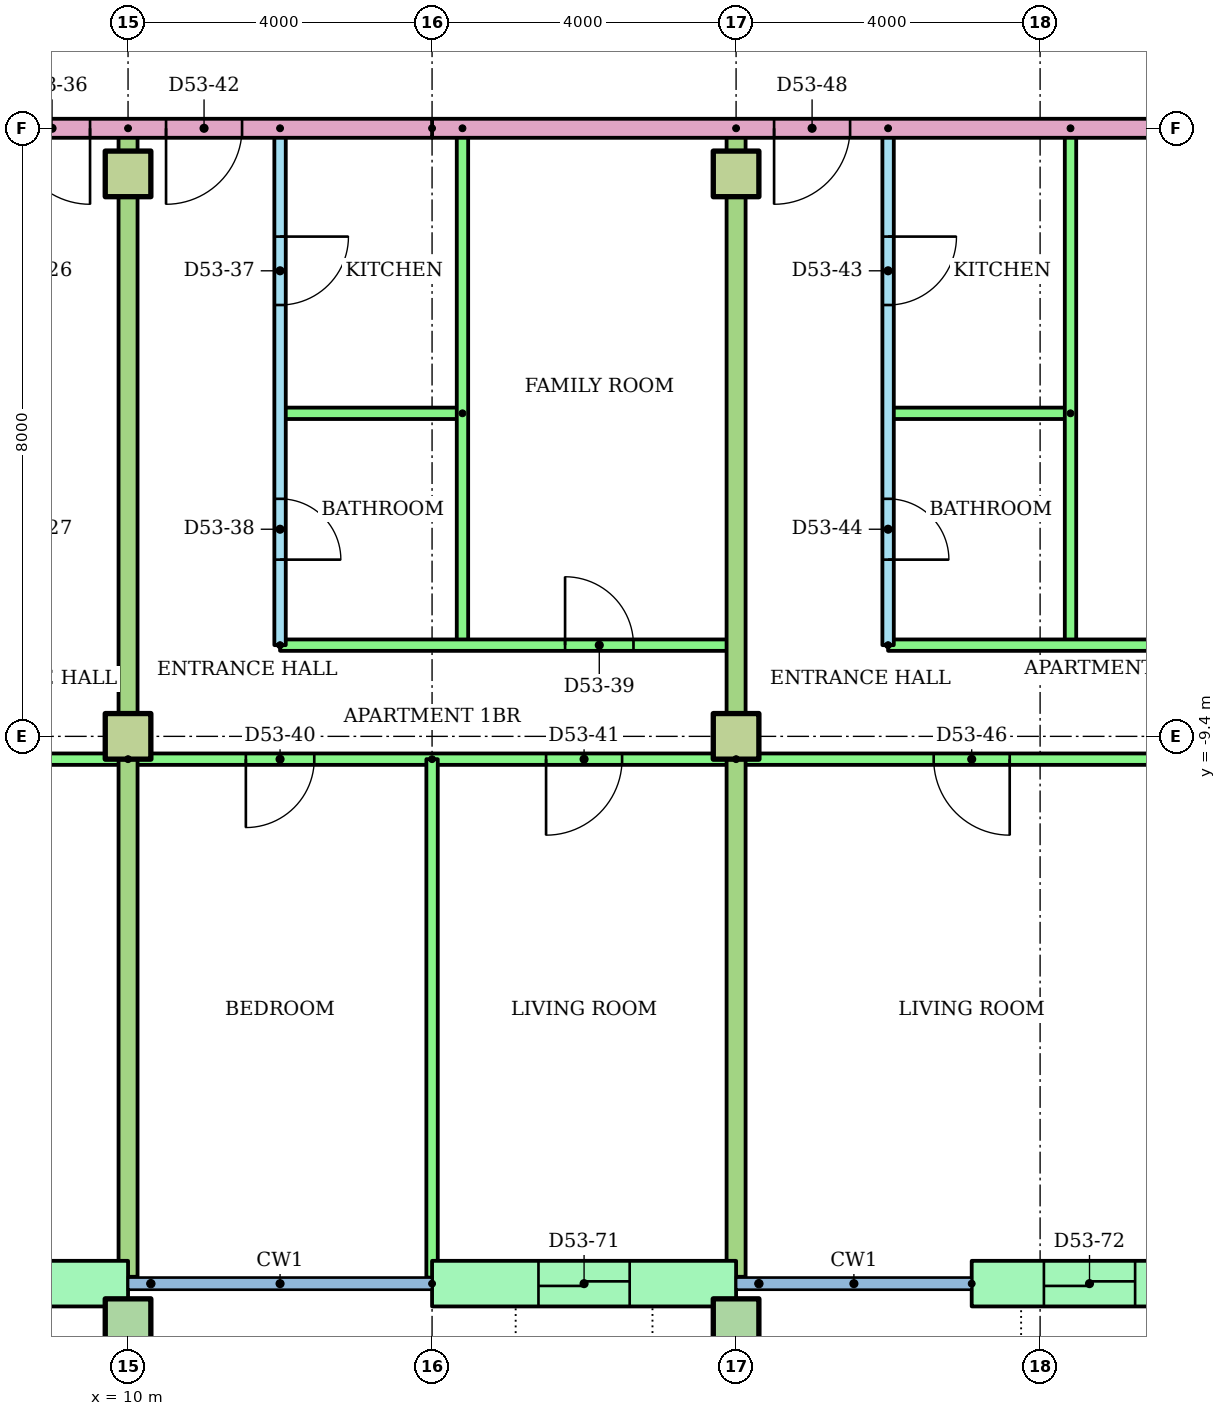
"""IFC4 building model, lengths in metres.
Left out: names, types, materials, properties, quantities, classifications, styles, units other than length and angle.
Written with IfcOpenShell. Run it as: python <this file> out.ifc"""

import sys

from ifc_helpers import new_model, si_unit, direction, frame, frame_2d, origin, origin_2d, place, context, subcontext, project, spatial, rectangle, hollow_rectangle, extrude, element, fill, save


model = new_model("IFC4")
c1 = context("Model", 3, precision=1e-05, world=origin(), true_north=direction((0.0, 1.0)))
c2 = subcontext(c1, "Body", "Model", "MODEL_VIEW")
j1 = project(units=[si_unit("LENGTHUNIT", "METRE"), si_unit("PLANEANGLEUNIT", "RADIAN")], contexts=[c1])
p1 = place(None, origin())
s1 = spatial("IfcSite", under=j1, at=p1, CompositionType="ELEMENT")
p2 = place(p1, origin())
s2 = spatial("IfcBuilding", under=s1, at=p2, CompositionType="ELEMENT")
p3 = place(p2, frame((0.0, 0.0, 207.6)))
s3 = spatial("IfcBuildingStorey", under=s2, at=p3, CompositionType="ELEMENT", Elevation=207.6)
for number, where in (
    (1, (10.0, -17.1, 0.0)),
    (2, (18.0, -17.1, 0.0)),
):
    element("IfcColumn", number, at=place(p3, frame(where)), inside=s3, PredefinedType="COLUMN", context=c2, shape_type="SweptSolid", body=[
        extrude(hollow_rectangle(XDim=0.6, YDim=0.6, WallThickness=0.03, at=origin_2d()), origin(), (0.0, 0.0, 1.0), 3.2),
    ])
for number, where in (
    (3, (10.0, -9.4, 0.0)),
    (4, (18.0, -9.4, 0.0)),
    (5, (10.0, -2.0, 0.0)),
    (6, (18.0, -2.0, 0.0)),
):
    element("IfcColumn", number, at=place(p3, frame(where)), inside=s3, PredefinedType="COLUMN", context=c2, shape_type="SweptSolid", body=[
        extrude(rectangle(XDim=0.6, YDim=0.6, at=origin_2d()), origin(), (0.0, 0.0, 1.0), 3.2),
    ])
p4 = place(p3, frame((6.0, -16.6, 0.0)))
e7 = element("IfcWall", 7, at=p4, inside=s3, PredefinedType="STANDARD", context=c2, shape_type="SweptSolid", body=[
    extrude(rectangle(XDim=4.0, YDim=0.6, at=frame_2d((2.0, 0.0))), origin(), (0.0, 0.0, 1.0), 2.92),
])
p5 = place(p4, frame((1.4, 0.0, 0.0)))
e8 = element("IfcOpeningElement", 8, at=p5, cuts=e7, PredefinedType="OPENING", context=c2, shape_type="SweptSolid", body=[
    extrude(rectangle(XDim=1.2, YDim=2.1, at=frame_2d((0.6, 1.05))), frame((0.0, 0.31, 0.0), z_axis=(0.0, -1.0, 0.0), x_axis=(1.0, 0.0, 0.0)), (0.0, 0.0, 1.0), 0.62),
])
p6 = place(p3, frame((14.0, -16.6, 0.0)))
e9 = element("IfcWall", 9, at=p6, inside=s3, PredefinedType="STANDARD", context=c2, shape_type="SweptSolid", body=[
    extrude(rectangle(XDim=4.0, YDim=0.6, at=frame_2d((2.0, 0.0))), origin(), (0.0, 0.0, 1.0), 2.92),
])
p7 = place(p6, frame((1.4, 0.0, 0.0)))
e10 = element("IfcOpeningElement", 10, at=p7, cuts=e9, PredefinedType="OPENING", context=c2, shape_type="SweptSolid", body=[
    extrude(rectangle(XDim=1.2, YDim=2.1, at=frame_2d((0.6, 1.05))), frame((0.0, 0.31, 0.0), z_axis=(0.0, -1.0, 0.0), x_axis=(1.0, 0.0, 0.0)), (0.0, 0.0, 1.0), 0.62),
])
p8 = place(p3, frame((21.1, -16.6, 0.0)))
e11 = element("IfcWall", 11, at=p8, inside=s3, PredefinedType="STANDARD", context=c2, shape_type="SweptSolid", body=[
    extrude(rectangle(XDim=3.1, YDim=0.6, at=frame_2d((1.55, 0.0))), origin(), (0.0, 0.0, 1.0), 2.92),
])
p9 = place(p8, frame((0.95, 0.0, 0.0)))
e12 = element("IfcOpeningElement", 12, at=p9, cuts=e11, PredefinedType="OPENING", context=c2, shape_type="SweptSolid", body=[
    extrude(rectangle(XDim=1.2, YDim=2.1, at=frame_2d((0.6, 1.05))), frame((0.0, 0.31, 0.0), z_axis=(0.0, -1.0, 0.0), x_axis=(1.0, 0.0, 0.0)), (0.0, 0.0, 1.0), 0.62),
])
p10 = place(p3, frame((10.0, -9.7, 0.0), z_axis=(0.0, 0.0, 1.0), x_axis=(-1.0, 0.0, 0.0)))
e13 = element("IfcWall", 13, at=p10, inside=s3, PredefinedType="PARTITIONING", context=c2, shape_type="SweptSolid", body=[
    extrude(rectangle(XDim=24.0, YDim=0.15, at=frame_2d((12.0, 0.0))), origin(), (0.0, 0.0, 1.0), 2.4),
])
p11 = place(p10, frame((21.55, 0.0, 0.0)))
e14 = element("IfcOpeningElement", 14, at=p11, cuts=e13, PredefinedType="OPENING", context=c2, shape_type="SweptSolid", body=[
    extrude(rectangle(XDim=0.9, YDim=2.1, at=frame_2d((0.45, 1.05))), frame((0.0, 0.085, 0.0), z_axis=(0.0, -1.0, 0.0), x_axis=(1.0, 0.0, 0.0)), (0.0, 0.0, 1.0), 0.17),
])
p12 = place(p10, frame((17.55, 0.0, 0.0)))
e15 = element("IfcOpeningElement", 15, at=p12, cuts=e13, PredefinedType="OPENING", context=c2, shape_type="SweptSolid", body=[
    extrude(rectangle(XDim=0.9, YDim=2.1, at=frame_2d((0.45, 1.05))), frame((0.0, 0.085, 0.0), z_axis=(0.0, -1.0, 0.0), x_axis=(1.0, 0.0, 0.0)), (0.0, 0.0, 1.0), 0.17),
])
p13 = place(p10, frame((11.5, 0.0, 0.0)))
e16 = element("IfcOpeningElement", 16, at=p13, cuts=e13, PredefinedType="OPENING", context=c2, shape_type="SweptSolid", body=[
    extrude(rectangle(XDim=1.0, YDim=2.1, at=frame_2d((0.5, 1.05))), frame((0.0, 0.085, 0.0), z_axis=(0.0, -1.0, 0.0), x_axis=(1.0, 0.0, 0.0)), (0.0, 0.0, 1.0), 0.17),
])
p14 = place(p10, frame((5.55, 0.0, 0.0)))
e17 = element("IfcOpeningElement", 17, at=p14, cuts=e13, PredefinedType="OPENING", context=c2, shape_type="SweptSolid", body=[
    extrude(rectangle(XDim=0.9, YDim=2.1, at=frame_2d((0.45, 1.05))), frame((0.0, 0.085, 0.0), z_axis=(0.0, -1.0, 0.0), x_axis=(1.0, 0.0, 0.0)), (0.0, 0.0, 1.0), 0.17),
])
p15 = place(p10, frame((1.55, 0.0, 0.0)))
e18 = element("IfcOpeningElement", 18, at=p15, cuts=e13, PredefinedType="OPENING", context=c2, shape_type="SweptSolid", body=[
    extrude(rectangle(XDim=0.9, YDim=2.1, at=frame_2d((0.45, 1.05))), frame((0.0, 0.085, 0.0), z_axis=(0.0, -1.0, 0.0), x_axis=(1.0, 0.0, 0.0)), (0.0, 0.0, 1.0), 0.17),
])
p16 = place(p3, frame((12.0, -1.4, 0.0), z_axis=(0.0, 0.0, 1.0), x_axis=(0.0, -1.0, 0.0)))
e19 = element("IfcWall", 19, at=p16, inside=s3, PredefinedType="PARTITIONING", context=c2, shape_type="SweptSolid", body=[
    extrude(rectangle(XDim=6.8, YDim=0.15, at=frame_2d((3.4, 0.0))), origin(), (0.0, 0.0, 1.0), 2.4),
])
p17 = place(p16, frame((1.425, 0.0, 0.0)))
e20 = element("IfcOpeningElement", 20, at=p17, cuts=e19, PredefinedType="OPENING", context=c2, shape_type="SweptSolid", body=[
    extrude(rectangle(XDim=0.9, YDim=2.1, at=frame_2d((0.45, 1.05))), frame((0.0, 0.085, 0.0), z_axis=(0.0, -1.0, 0.0), x_axis=(1.0, 0.0, 0.0)), (0.0, 0.0, 1.0), 0.17),
])
p18 = place(p16, frame((4.875, 0.0, 0.0)))
e21 = element("IfcOpeningElement", 21, at=p18, cuts=e19, PredefinedType="OPENING", context=c2, shape_type="SweptSolid", body=[
    extrude(rectangle(XDim=0.8, YDim=2.1, at=frame_2d((0.4, 1.05))), frame((0.0, 0.085, 0.0), z_axis=(0.0, -1.0, 0.0), x_axis=(1.0, 0.0, 0.0)), (0.0, 0.0, 1.0), 0.17),
])
p19 = place(p3, frame((14.4, -5.15, 0.0), z_axis=(0.0, 0.0, 1.0), x_axis=(-1.0, 0.0, 0.0)))
e22 = element("IfcWall", 22, at=p19, inside=s3, PredefinedType="PARTITIONING", context=c2, shape_type="SweptSolid", body=[
    extrude(rectangle(XDim=2.4, YDim=0.15, at=frame_2d((1.2, 0.0))), origin(), (0.0, 0.0, 1.0), 2.4),
])
p20 = place(p3, frame((14.4, -1.4, 0.0), z_axis=(0.0, 0.0, 1.0), x_axis=(0.0, -1.0, 0.0)))
e23 = element("IfcWall", 23, at=p20, inside=s3, PredefinedType="PARTITIONING", context=c2, shape_type="SweptSolid", body=[
    extrude(rectangle(XDim=6.8, YDim=0.15, at=frame_2d((3.4, 0.0))), origin(), (0.0, 0.0, 1.0), 2.4),
])
p21 = place(p3, frame((12.0, -8.2, 0.0)))
e24 = element("IfcWall", 24, at=p21, inside=s3, PredefinedType="PARTITIONING", context=c2, shape_type="SweptSolid", body=[
    extrude(rectangle(XDim=6.0, YDim=0.15, at=frame_2d((3.0, 0.0))), origin(), (0.0, 0.0, 1.0), 2.4),
])
p22 = place(p21, frame((3.75, 0.0, 0.0)))
e25 = element("IfcOpeningElement", 25, at=p22, cuts=e24, PredefinedType="OPENING", context=c2, shape_type="SweptSolid", body=[
    extrude(rectangle(XDim=0.9, YDim=2.1, at=frame_2d((0.45, 1.05))), frame((0.0, 0.085, 0.0), z_axis=(0.0, -1.0, 0.0), x_axis=(1.0, 0.0, 0.0)), (0.0, 0.0, 1.0), 0.17),
])
p23 = place(p3, frame((18.0, -9.7, 0.0), z_axis=(0.0, 0.0, 1.0), x_axis=(-1.0, 0.0, 0.0)))
e26 = element("IfcWall", 26, at=p23, inside=s3, PredefinedType="PARTITIONING", context=c2, shape_type="SweptSolid", body=[
    extrude(rectangle(XDim=8.0, YDim=0.15, at=frame_2d((4.0, 0.0))), origin(), (0.0, 0.0, 1.0), 2.4),
])
p24 = place(p23, frame((5.55, 0.0, 0.0)))
e27 = element("IfcOpeningElement", 27, at=p24, cuts=e26, PredefinedType="OPENING", context=c2, shape_type="SweptSolid", body=[
    extrude(rectangle(XDim=0.9, YDim=2.1, at=frame_2d((0.45, 1.05))), frame((0.0, 0.085, 0.0), z_axis=(0.0, -1.0, 0.0), x_axis=(1.0, 0.0, 0.0)), (0.0, 0.0, 1.0), 0.17),
])
p25 = place(p23, frame((1.5, 0.0, 0.0)))
e28 = element("IfcOpeningElement", 28, at=p25, cuts=e26, PredefinedType="OPENING", context=c2, shape_type="SweptSolid", body=[
    extrude(rectangle(XDim=1.0, YDim=2.1, at=frame_2d((0.5, 1.05))), frame((0.0, 0.085, 0.0), z_axis=(0.0, -1.0, 0.0), x_axis=(1.0, 0.0, 0.0)), (0.0, 0.0, 1.0), 0.17),
])
p26 = place(p3, frame((14.0, -9.7, 0.0), z_axis=(0.0, 0.0, 1.0), x_axis=(0.0, -1.0, 0.0)))
e29 = element("IfcWall", 29, at=p26, inside=s3, PredefinedType="PARTITIONING", context=c2, shape_type="SweptSolid", body=[
    extrude(rectangle(XDim=6.821, YDim=0.15, at=frame_2d((3.411, 0.0))), origin(), (0.0, 0.0, 1.0), 2.4),
])
p27 = place(p3, frame((10.0, -1.4, 0.0), z_axis=(0.0, 0.0, 1.0), x_axis=(0.0, -1.0, 0.0)))
e30 = element("IfcWall", 30, at=p27, inside=s3, PredefinedType="PARTITIONING", context=c2, shape_type="SweptSolid", body=[
    extrude(rectangle(XDim=15.11, YDim=0.25, at=frame_2d((7.555, 0.0))), origin(), (0.0, 0.0, 1.0), 2.4),
])
p28 = place(p3, frame((20.0, -1.4, 0.0), z_axis=(0.0, 0.0, 1.0), x_axis=(0.0, -1.0, 0.0)))
e31 = element("IfcWall", 31, at=p28, inside=s3, PredefinedType="PARTITIONING", context=c2, shape_type="SweptSolid", body=[
    extrude(rectangle(XDim=6.8, YDim=0.15, at=frame_2d((3.4, 0.0))), origin(), (0.0, 0.0, 1.0), 2.4),
])
p29 = place(p28, frame((1.425, 0.0, 0.0)))
e32 = element("IfcOpeningElement", 32, at=p29, cuts=e31, PredefinedType="OPENING", context=c2, shape_type="SweptSolid", body=[
    extrude(rectangle(XDim=0.9, YDim=2.1, at=frame_2d((0.45, 1.05))), frame((0.0, 0.085, 0.0), z_axis=(0.0, -1.0, 0.0), x_axis=(1.0, 0.0, 0.0)), (0.0, 0.0, 1.0), 0.17),
])
p30 = place(p28, frame((4.875, 0.0, 0.0)))
e33 = element("IfcOpeningElement", 33, at=p30, cuts=e31, PredefinedType="OPENING", context=c2, shape_type="SweptSolid", body=[
    extrude(rectangle(XDim=0.8, YDim=2.1, at=frame_2d((0.4, 1.05))), frame((0.0, 0.085, 0.0), z_axis=(0.0, -1.0, 0.0), x_axis=(1.0, 0.0, 0.0)), (0.0, 0.0, 1.0), 0.17),
])
p31 = place(p3, frame((22.4, -5.15, 0.0), z_axis=(0.0, 0.0, 1.0), x_axis=(-1.0, 0.0, 0.0)))
e34 = element("IfcWall", 34, at=p31, inside=s3, PredefinedType="PARTITIONING", context=c2, shape_type="SweptSolid", body=[
    extrude(rectangle(XDim=2.4, YDim=0.15, at=frame_2d((1.2, 0.0))), origin(), (0.0, 0.0, 1.0), 2.4),
])
p32 = place(p3, frame((22.4, -1.4, 0.0), z_axis=(0.0, 0.0, 1.0), x_axis=(0.0, -1.0, 0.0)))
e35 = element("IfcWall", 35, at=p32, inside=s3, PredefinedType="PARTITIONING", context=c2, shape_type="SweptSolid", body=[
    extrude(rectangle(XDim=6.8, YDim=0.15, at=frame_2d((3.4, 0.0))), origin(), (0.0, 0.0, 1.0), 2.4),
])
p33 = place(p3, frame((20.0, -8.2, 0.0)))
e36 = element("IfcWall", 36, at=p33, inside=s3, PredefinedType="PARTITIONING", context=c2, shape_type="SweptSolid", body=[
    extrude(rectangle(XDim=8.92, YDim=0.15, at=frame_2d((4.46, 0.0))), origin(), (0.0, 0.0, 1.0), 2.4),
])
p34 = place(p33, frame((4.624, 0.0, 0.0)))
e37 = element("IfcOpeningElement", 37, at=p34, cuts=e36, PredefinedType="OPENING", context=c2, shape_type="SweptSolid", body=[
    extrude(rectangle(XDim=0.9, YDim=2.1, at=frame_2d((0.45, 1.05))), frame((0.0, 0.085, 0.0), z_axis=(0.0, -1.0, 0.0), x_axis=(1.0, 0.0, 0.0)), (0.0, 0.0, 1.0), 0.17),
])
p35 = place(p3, frame((28.92, -9.7, 0.0), z_axis=(0.0, 0.0, 1.0), x_axis=(-1.0, 0.0, 0.0)))
e38 = element("IfcWall", 38, at=p35, inside=s3, PredefinedType="PARTITIONING", context=c2, shape_type="SweptSolid", body=[
    extrude(rectangle(XDim=10.92, YDim=0.15, at=frame_2d((5.46, 0.0))), origin(), (0.0, 0.0, 1.0), 2.4),
])
p36 = place(p35, frame((7.32, 0.0, 0.0)))
e39 = element("IfcOpeningElement", 39, at=p36, cuts=e38, PredefinedType="OPENING", context=c2, shape_type="SweptSolid", body=[
    extrude(rectangle(XDim=1.0, YDim=2.1, at=frame_2d((0.5, 1.05))), frame((0.0, 0.085, 0.0), z_axis=(0.0, -1.0, 0.0), x_axis=(1.0, 0.0, 0.0)), (0.0, 0.0, 1.0), 0.17),
])
p37 = place(p35, frame((1.544, 0.0, 0.0)))
e40 = element("IfcOpeningElement", 40, at=p37, cuts=e38, PredefinedType="OPENING", context=c2, shape_type="SweptSolid", body=[
    extrude(rectangle(XDim=0.9, YDim=2.1, at=frame_2d((0.45, 1.05))), frame((0.0, 0.085, 0.0), z_axis=(0.0, -1.0, 0.0), x_axis=(1.0, 0.0, 0.0)), (0.0, 0.0, 1.0), 0.17),
])
p38 = place(p3, frame((18.0, -1.4, 0.0), z_axis=(0.0, 0.0, 1.0), x_axis=(0.0, -1.0, 0.0)))
e41 = element("IfcWall", 41, at=p38, inside=s3, PredefinedType="PARTITIONING", context=c2, shape_type="SweptSolid", body=[
    extrude(rectangle(XDim=15.11, YDim=0.25, at=frame_2d((7.555, 0.0))), origin(), (0.0, 0.0, 1.0), 2.4),
])
p39 = place(p3, frame((28.92, -1.4, 0.0), z_axis=(0.0, 0.0, 1.0), x_axis=(-1.0, 0.0, 0.0)))
e42 = element("IfcWall", 42, at=p39, inside=s3, PredefinedType="PARTITIONING", context=c2, shape_type="SweptSolid", body=[
    extrude(rectangle(XDim=14.92, YDim=0.25, at=frame_2d((7.46, 0.0))), origin(), (0.0, 0.0, 1.0), 2.4),
])
p40 = place(p39, frame((9.42, 0.0, 0.0)))
e43 = element("IfcOpeningElement", 43, at=p40, cuts=e42, PredefinedType="OPENING", context=c2, shape_type="SweptSolid", body=[
    extrude(rectangle(XDim=1.0, YDim=2.1, at=frame_2d((0.5, 1.05))), frame((0.0, 0.135, 0.0), z_axis=(0.0, -1.0, 0.0), x_axis=(1.0, 0.0, 0.0)), (0.0, 0.0, 1.0), 0.27),
])
p41 = place(p3, frame((14.0, -1.4, 0.0), z_axis=(0.0, 0.0, 1.0), x_axis=(-1.0, 0.0, 0.0)))
e44 = element("IfcWall", 44, at=p41, inside=s3, PredefinedType="PARTITIONING", context=c2, shape_type="SweptSolid", body=[
    extrude(rectangle(XDim=28.0, YDim=0.25, at=frame_2d((14.0, 0.0))), origin(), (0.0, 0.0, 1.0), 2.4),
])
p42 = place(p41, frame((4.5, 0.0, 0.0)))
e45 = element("IfcOpeningElement", 45, at=p42, cuts=e44, PredefinedType="OPENING", context=c2, shape_type="SweptSolid", body=[
    extrude(rectangle(XDim=1.0, YDim=2.1, at=frame_2d((0.5, 1.05))), frame((0.0, 0.135, 0.0), z_axis=(0.0, -1.0, 0.0), x_axis=(1.0, 0.0, 0.0)), (0.0, 0.0, 1.0), 0.27),
])
p43 = place(p41, frame((2.5, 0.0, 0.0)))
e46 = element("IfcOpeningElement", 46, at=p43, cuts=e44, PredefinedType="OPENING", context=c2, shape_type="SweptSolid", body=[
    extrude(rectangle(XDim=1.0, YDim=2.1, at=frame_2d((0.5, 1.05))), frame((0.0, 0.135, 0.0), z_axis=(0.0, -1.0, 0.0), x_axis=(1.0, 0.0, 0.0)), (0.0, 0.0, 1.0), 0.27),
])
p44 = place(p42, origin())
e47 = element("IfcDoor", 47, at=p44, inside=s3, OperationType="SINGLE_SWING_LEFT", PredefinedType="DOOR", context=c2, shape_type="SweptSolid", body=[
    extrude(rectangle(XDim=1.0, YDim=2.1, at=frame_2d((0.5, 1.05))), frame((0.0, 0.025, 0.0), z_axis=(0.0, -1.0, 0.0), x_axis=(1.0, 0.0, 0.0)), (0.0, 0.0, 1.0), 0.05),
])
fill(e45, e47)
p45 = place(p17, origin())
e48 = element("IfcDoor", 48, at=p45, inside=s3, OperationType="SINGLE_SWING_LEFT", PredefinedType="DOOR", context=c2, shape_type="SweptSolid", body=[
    extrude(rectangle(XDim=0.9, YDim=2.1, at=frame_2d((0.45, 1.05))), frame((0.0, 0.025, 0.0), z_axis=(0.0, -1.0, 0.0), x_axis=(1.0, 0.0, 0.0)), (0.0, 0.0, 1.0), 0.05),
])
fill(e20, e48)
p46 = place(p18, origin())
e49 = element("IfcDoor", 49, at=p46, inside=s3, OperationType="SINGLE_SWING_RIGHT", PredefinedType="DOOR", context=c2, shape_type="SweptSolid", body=[
    extrude(rectangle(XDim=0.8, YDim=2.1, at=frame_2d((0.4, 1.05))), frame((0.0, 0.025, 0.0), z_axis=(0.0, -1.0, 0.0), x_axis=(1.0, 0.0, 0.0)), (0.0, 0.0, 1.0), 0.05),
])
fill(e21, e49)
p47 = place(p22, origin())
e50 = element("IfcDoor", 50, at=p47, inside=s3, OperationType="SINGLE_SWING_LEFT", PredefinedType="DOOR", context=c2, shape_type="SweptSolid", body=[
    extrude(rectangle(XDim=0.9, YDim=2.1, at=frame_2d((0.45, 1.05))), frame((0.0, 0.025, 0.0), z_axis=(0.0, -1.0, 0.0), x_axis=(1.0, 0.0, 0.0)), (0.0, 0.0, 1.0), 0.05),
])
fill(e25, e50)
p48 = place(p24, origin())
e51 = element("IfcDoor", 51, at=p48, inside=s3, OperationType="SINGLE_SWING_RIGHT", PredefinedType="DOOR", context=c2, shape_type="SweptSolid", body=[
    extrude(rectangle(XDim=0.9, YDim=2.1, at=frame_2d((0.45, 1.05))), frame((0.0, 0.025, 0.0), z_axis=(0.0, -1.0, 0.0), x_axis=(1.0, 0.0, 0.0)), (0.0, 0.0, 1.0), 0.05),
])
fill(e27, e51)
p49 = place(p25, origin())
e52 = element("IfcDoor", 52, at=p49, inside=s3, OperationType="SINGLE_SWING_RIGHT", PredefinedType="DOOR", context=c2, shape_type="SweptSolid", body=[
    extrude(rectangle(XDim=1.0, YDim=2.1, at=frame_2d((0.5, 1.05))), frame((0.0, 0.025, 0.0), z_axis=(0.0, -1.0, 0.0), x_axis=(1.0, 0.0, 0.0)), (0.0, 0.0, 1.0), 0.05),
])
fill(e28, e52)
p50 = place(p43, origin())
e53 = element("IfcDoor", 53, at=p50, inside=s3, OperationType="SINGLE_SWING_RIGHT", PredefinedType="DOOR", context=c2, shape_type="SweptSolid", body=[
    extrude(rectangle(XDim=1.0, YDim=2.1, at=frame_2d((0.5, 1.05))), frame((0.0, 0.025, 0.0), z_axis=(0.0, -1.0, 0.0), x_axis=(1.0, 0.0, 0.0)), (0.0, 0.0, 1.0), 0.05),
])
fill(e46, e53)
p51 = place(p29, origin())
e54 = element("IfcDoor", 54, at=p51, inside=s3, OperationType="SINGLE_SWING_LEFT", PredefinedType="DOOR", context=c2, shape_type="SweptSolid", body=[
    extrude(rectangle(XDim=0.9, YDim=2.1, at=frame_2d((0.45, 1.05))), frame((0.0, 0.025, 0.0), z_axis=(0.0, -1.0, 0.0), x_axis=(1.0, 0.0, 0.0)), (0.0, 0.0, 1.0), 0.05),
])
fill(e32, e54)
p52 = place(p30, origin())
e55 = element("IfcDoor", 55, at=p52, inside=s3, OperationType="SINGLE_SWING_RIGHT", PredefinedType="DOOR", context=c2, shape_type="SweptSolid", body=[
    extrude(rectangle(XDim=0.8, YDim=2.1, at=frame_2d((0.4, 1.05))), frame((0.0, 0.025, 0.0), z_axis=(0.0, -1.0, 0.0), x_axis=(1.0, 0.0, 0.0)), (0.0, 0.0, 1.0), 0.05),
])
fill(e33, e55)
p53 = place(p36, origin())
e56 = element("IfcDoor", 56, at=p53, inside=s3, OperationType="SINGLE_SWING_LEFT", PredefinedType="DOOR", context=c2, shape_type="SweptSolid", body=[
    extrude(rectangle(XDim=1.0, YDim=2.1, at=frame_2d((0.5, 1.05))), frame((0.0, 0.025, 0.0), z_axis=(0.0, -1.0, 0.0), x_axis=(1.0, 0.0, 0.0)), (0.0, 0.0, 1.0), 0.05),
])
fill(e39, e56)
p54 = place(p40, origin())
e57 = element("IfcDoor", 57, at=p54, inside=s3, OperationType="SINGLE_SWING_RIGHT", PredefinedType="DOOR", context=c2, shape_type="SweptSolid", body=[
    extrude(rectangle(XDim=1.0, YDim=2.1, at=frame_2d((0.5, 1.05))), frame((0.0, 0.025, 0.0), z_axis=(0.0, -1.0, 0.0), x_axis=(1.0, 0.0, 0.0)), (0.0, 0.0, 1.0), 0.05),
])
fill(e43, e57)
p55 = place(p7, origin())
e58 = element("IfcDoor", 58, at=p55, inside=s3, OperationType="SLIDING_TO_LEFT", PredefinedType="DOOR", context=c2, shape_type="SweptSolid", body=[
    extrude(rectangle(XDim=1.2, YDim=2.1, at=frame_2d((0.6, 1.05))), frame((0.0, 0.025, 0.0), z_axis=(0.0, -1.0, 0.0), x_axis=(1.0, 0.0, 0.0)), (0.0, 0.0, 1.0), 0.05),
])
fill(e10, e58)
p56 = place(p9, origin())
e59 = element("IfcDoor", 59, at=p56, inside=s3, OperationType="SLIDING_TO_LEFT", PredefinedType="DOOR", context=c2, shape_type="SweptSolid", body=[
    extrude(rectangle(XDim=1.2, YDim=2.1, at=frame_2d((0.6, 1.05))), frame((0.0, 0.025, 0.0), z_axis=(0.0, -1.0, 0.0), x_axis=(1.0, 0.0, 0.0)), (0.0, 0.0, 1.0), 0.05),
])
fill(e12, e59)
save(model, sys.argv[1])
